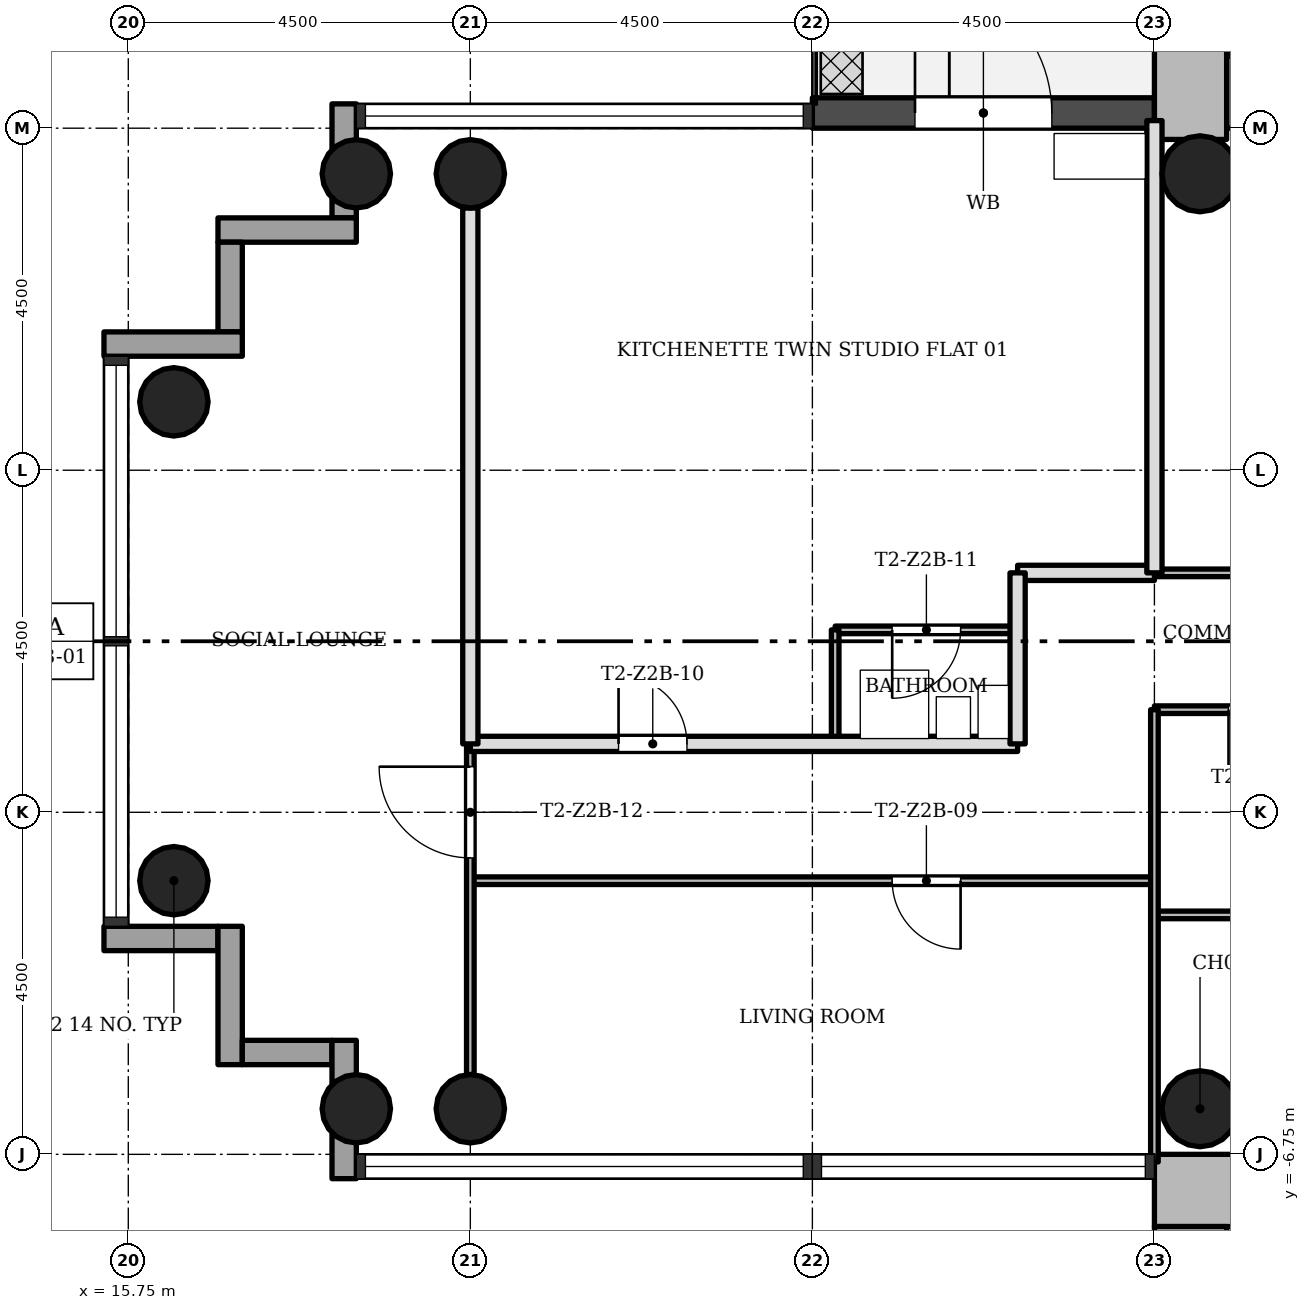
"""IFC4 building model, lengths in metres.
Left out: names, types, materials, properties, quantities, classifications, styles, units other than length and angle.
Written with IfcOpenShell. Run it as: python <this file> out.ifc"""

import sys

from ifc_helpers import new_model, si_unit, direction, frame, frame_2d, origin, origin_2d, place, context, subcontext, project, spatial, rectangle, hollow_circle, extrude, element, fill, save


model = new_model("IFC4")
c1 = context("Model", 3, precision=1e-05, world=origin(), true_north=direction((0.0, 1.0)))
c2 = subcontext(c1, "Body", "Model", "MODEL_VIEW")
j1 = project(units=[si_unit("LENGTHUNIT", "METRE"), si_unit("PLANEANGLEUNIT", "RADIAN")], contexts=[c1])
p1 = place(None, origin())
s1 = spatial("IfcSite", under=j1, at=p1, CompositionType="ELEMENT")
p2 = place(p1, origin())
s2 = spatial("IfcBuilding", under=s1, at=p2, CompositionType="ELEMENT")
p3 = place(p2, frame((0.0, 0.0, 76.6)))
s3 = spatial("IfcBuildingStorey", under=s2, at=p3, CompositionType="ELEMENT", Elevation=76.6)
p4 = place(p3, frame((30.2, 7.225, 0.0), z_axis=(0.0, 0.0, 1.0), x_axis=(1.0, 0.0, 0.0)))
e1 = element("IfcWall", 1, at=p4, inside=s3, PredefinedType="SHEAR", context=c2, shape_type="SweptSolid", body=[
    extrude(rectangle(XDim=12.55, YDim=0.95, at=frame_2d((6.275, 0.0))), origin(), (0.0, 0.0, 1.0), 3.4),
])
p5 = place(p4, frame((4.9, 0.0, 0.0)))
e2 = element("IfcOpeningElement", 2, at=p5, cuts=e1, PredefinedType="OPENING", context=c2, shape_type="SweptSolid", body=[
    extrude(rectangle(XDim=1.8, YDim=2.1, at=frame_2d((0.9, 1.05))), frame((0.0, 0.485, 0.0), z_axis=(0.0, -1.0, 0.0), x_axis=(1.0, 0.0, 0.0)), (0.0, 0.0, 1.0), 0.97),
])
p6 = place(p3, frame((29.725, 15.298, 0.0), z_axis=(0.0, 0.0, 1.0), x_axis=(0.0, -1.0, 0.0)))
e3 = element("IfcWall", 3, at=p6, inside=s3, PredefinedType="SHEAR", context=c2, shape_type="SweptSolid", body=[
    extrude(rectangle(XDim=8.696, YDim=0.95, at=frame_2d((4.348, 0.0))), origin(), (0.0, 0.0, 1.0), 3.4),
])
p7 = place(p3, frame((41.8, -7.225, 0.0), z_axis=(0.0, 0.0, 1.0), x_axis=(-1.0, 0.0, 0.0)))
e4 = element("IfcWall", 4, at=p7, inside=s3, PredefinedType="SHEAR", context=c2, shape_type="SweptSolid", body=[
    extrude(rectangle(XDim=12.55, YDim=0.95, at=frame_2d((6.275, 0.0))), origin(), (0.0, 0.0, 1.0), 3.4),
])
p8 = place(p7, frame((4.9, 0.0, 0.0)))
e5 = element("IfcOpeningElement", 5, at=p8, cuts=e4, PredefinedType="OPENING", context=c2, shape_type="SweptSolid", body=[
    extrude(rectangle(XDim=1.8, YDim=2.1, at=frame_2d((0.9, 1.05))), frame((0.0, 0.485, 0.0), z_axis=(0.0, -1.0, 0.0), x_axis=(1.0, 0.0, 0.0)), (0.0, 0.0, 1.0), 0.97),
])
p9 = place(p3, frame((29.725, -7.7, 0.0), z_axis=(0.0, 0.0, 1.0), x_axis=(0.0, -1.0, 0.0)))
e6 = element("IfcWall", 6, at=p9, inside=s3, PredefinedType="SHEAR", context=c2, shape_type="SweptSolid", body=[
    extrude(rectangle(XDim=8.05, YDim=0.95, at=frame_2d((4.025, 0.0))), origin(), (0.0, 0.0, 1.0), 3.4),
])
for number, where, z_axis, x_axis in (
    (7, (20.25, 6.15, 0.0), (0.0, 0.0, 1.0), (1.0, 0.0, 0.0)),
    (8, (20.25, -6.15, 0.0), (0.0, 0.0, 1.0), (1.0, 0.0, 0.0)),
    (9, (18.75, 6.15, 0.0), (0.0, 0.0, 1.0), (1.0, 0.0, 0.0)),
    (10, (18.75, -6.15, 0.0), (0.0, 0.0, 1.0), (1.0, 0.0, 0.0)),
    (11, (16.35, 3.15, 0.0), (0.0, 0.0, 1.0), (1.0, 0.0, 0.0)),
    (12, (16.35, -3.15, 0.0), (0.0, 0.0, 1.0), (1.0, 0.0, 0.0)),
):
    element("IfcColumn", number, at=place(p3, frame(where, z_axis=z_axis, x_axis=x_axis)), inside=s3, PredefinedType="COLUMN", context=c2, shape_type="SweptSolid", body=[
        extrude(hollow_circle(Radius=0.45, WallThickness=0.032, at=origin_2d()), origin(), (0.0, 0.0, 1.0), 3.4),
    ])
for number, where, z_axis, x_axis in (
    (13, (29.85, 6.15, 0.0), (0.0, 0.0, 1.0), (1.0, 0.0, 0.0)),
    (14, (29.85, -6.15, 0.0), (0.0, 0.0, 1.0), (1.0, 0.0, 0.0)),
):
    element("IfcColumn", number, at=place(p3, frame(where, z_axis=z_axis, x_axis=x_axis)), inside=s3, PredefinedType="COLUMN", context=c2, shape_type="SweptSolid", body=[
        extrude(hollow_circle(Radius=0.5, WallThickness=0.036, at=origin_2d()), origin(), (0.0, 0.0, 1.0), 3.4),
    ])
p10 = place(p3, frame((29.25, 6.95, -0.02), z_axis=(0.0, 0.0, 1.0), x_axis=(-1.0, 0.0, 0.0)))
e15 = element("IfcWall", 15, at=p10, inside=s3, PredefinedType="STANDARD", context=c2, shape_type="SweptSolid", body=[
    extrude(rectangle(XDim=4.5, YDim=0.4, at=frame_2d((2.25, 0.0))), origin(), (0.0, 0.0, 1.0), 3.12),
])
p11 = place(p10, frame((1.35, 0.0, 0.02)))
e16 = element("IfcOpeningElement", 16, at=p11, cuts=e15, PredefinedType="OPENING", context=c2, shape_type="SweptSolid", body=[
    extrude(rectangle(XDim=1.8, YDim=2.1, at=frame_2d((0.9, 1.05))), frame((0.0, 0.21, 0.0), z_axis=(0.0, -1.0, 0.0), x_axis=(1.0, 0.0, 0.0)), (0.0, 0.0, 1.0), 0.42),
])
p12 = place(p3, frame((18.59, 7.07, -0.3), z_axis=(0.0, 0.0, 1.0), x_axis=(0.0, -1.0, 0.0)))
e17 = element("IfcWall", 17, at=p12, inside=s3, PredefinedType="STANDARD", context=c2, shape_type="SweptSolid", body=[
    extrude(rectangle(XDim=1.5, YDim=0.32, at=frame_2d((0.75, 0.0))), origin(), (0.0, 0.0, 1.0), 3.4),
])
p13 = place(p3, frame((18.75, 5.41, -0.3), z_axis=(0.0, 0.0, 1.0), x_axis=(-1.0, 0.0, 0.0)))
e18 = element("IfcWall", 18, at=p13, inside=s3, PredefinedType="STANDARD", context=c2, shape_type="SweptSolid", body=[
    extrude(rectangle(XDim=1.82, YDim=0.32, at=frame_2d((0.91, 0.0))), origin(), (0.0, 0.0, 1.0), 3.4),
])
p14 = place(p3, frame((17.09, 5.25, -0.3), z_axis=(0.0, 0.0, 1.0), x_axis=(0.0, -1.0, 0.0)))
e19 = element("IfcWall", 19, at=p14, inside=s3, PredefinedType="STANDARD", context=c2, shape_type="SweptSolid", body=[
    extrude(rectangle(XDim=1.18, YDim=0.32, at=frame_2d((0.59, 0.0))), origin(), (0.0, 0.0, 1.0), 3.4),
])
p15 = place(p3, frame((17.25, 3.91, -0.3), z_axis=(0.0, 0.0, 1.0), x_axis=(-1.0, 0.0, 0.0)))
e20 = element("IfcWall", 20, at=p15, inside=s3, PredefinedType="STANDARD", context=c2, shape_type="SweptSolid", body=[
    extrude(rectangle(XDim=1.82, YDim=0.32, at=frame_2d((0.91, 0.0))), origin(), (0.0, 0.0, 1.0), 3.4),
])
p16 = place(p3, frame((15.43, -3.91, -0.3), z_axis=(0.0, 0.0, 1.0), x_axis=(1.0, 0.0, 0.0)))
e21 = element("IfcWall", 21, at=p16, inside=s3, PredefinedType="STANDARD", context=c2, shape_type="SweptSolid", body=[
    extrude(rectangle(XDim=1.5, YDim=0.32, at=frame_2d((0.75, 0.0))), origin(), (0.0, 0.0, 1.0), 3.4),
])
p17 = place(p3, frame((17.09, -3.75, -0.3), z_axis=(0.0, 0.0, 1.0), x_axis=(0.0, -1.0, 0.0)))
e22 = element("IfcWall", 22, at=p17, inside=s3, PredefinedType="STANDARD", context=c2, shape_type="SweptSolid", body=[
    extrude(rectangle(XDim=1.82, YDim=0.32, at=frame_2d((0.91, 0.0))), origin(), (0.0, 0.0, 1.0), 3.4),
])
p18 = place(p3, frame((17.25, -5.41, -0.3), z_axis=(0.0, 0.0, 1.0), x_axis=(1.0, 0.0, 0.0)))
e23 = element("IfcWall", 23, at=p18, inside=s3, PredefinedType="STANDARD", context=c2, shape_type="SweptSolid", body=[
    extrude(rectangle(XDim=1.18, YDim=0.32, at=frame_2d((0.59, 0.0))), origin(), (0.0, 0.0, 1.0), 3.4),
])
p19 = place(p3, frame((18.59, -5.25, -0.3), z_axis=(0.0, 0.0, 1.0), x_axis=(0.0, -1.0, 0.0)))
e24 = element("IfcWall", 24, at=p19, inside=s3, PredefinedType="STANDARD", context=c2, shape_type="SweptSolid", body=[
    extrude(rectangle(XDim=1.82, YDim=0.32, at=frame_2d((0.91, 0.0))), origin(), (0.0, 0.0, 1.0), 3.4),
])
p20 = place(p3, frame((34.5, -3.6, 0.0), z_axis=(0.0, 0.0, 1.0), x_axis=(-1.0, 0.0, 0.0)))
e25 = element("IfcWall", 25, at=p20, inside=s3, PredefinedType="PARTITIONING", context=c2, shape_type="SweptSolid", body=[
    extrude(rectangle(XDim=5.25, YDim=0.1, at=frame_2d((2.625, 0.0))), origin(), (0.0, 0.0, 1.0), 3.0),
])
p21 = place(p3, frame((29.25, -3.15, 0.0), z_axis=(0.0, 0.0, 1.0), x_axis=(-1.0, 0.0, 0.0)))
e26 = element("IfcWall", 26, at=p21, inside=s3, PredefinedType="PARTITIONING", context=c2, shape_type="SweptSolid", body=[
    extrude(rectangle(XDim=9.0, YDim=0.1, at=frame_2d((4.5, 0.0))), origin(), (0.0, 0.0, 1.0), 3.0),
])
p22 = place(p21, frame((2.55, 0.0, 0.0)))
e27 = element("IfcOpeningElement", 27, at=p22, cuts=e26, PredefinedType="OPENING", context=c2, shape_type="SweptSolid", body=[
    extrude(rectangle(XDim=0.9, YDim=2.1, at=frame_2d((0.45, 1.05))), frame((0.0, 0.06, 0.0), z_axis=(0.0, -1.0, 0.0), x_axis=(1.0, 0.0, 0.0)), (0.0, 0.0, 1.0), 0.12),
])
p23 = place(p3, frame((27.45, -1.35, 0.0), z_axis=(0.0, 0.0, 1.0), x_axis=(-1.0, 0.0, 0.0)))
e28 = element("IfcWall", 28, at=p23, inside=s3, PredefinedType="SOLIDWALL", context=c2, shape_type="SweptSolid", body=[
    extrude(rectangle(XDim=7.2, YDim=0.2, at=frame_2d((3.6, 0.0))), origin(), (0.0, 0.0, 1.0), 3.0),
])
p24 = place(p23, frame((4.35, 0.0, 0.0)))
e29 = element("IfcOpeningElement", 29, at=p24, cuts=e28, PredefinedType="OPENING", context=c2, shape_type="SweptSolid", body=[
    extrude(rectangle(XDim=0.9, YDim=2.1, at=frame_2d((0.45, 1.05))), frame((0.0, 0.11, 0.0), z_axis=(0.0, -1.0, 0.0), x_axis=(1.0, 0.0, 0.0)), (0.0, 0.0, 1.0), 0.22),
])
p25 = place(p3, frame((34.5, -0.9, 0.0), z_axis=(0.0, 0.0, 1.0), x_axis=(-1.0, 0.0, 0.0)))
e30 = element("IfcWall", 30, at=p25, inside=s3, PredefinedType="PARTITIONING", context=c2, shape_type="SweptSolid", body=[
    extrude(rectangle(XDim=5.25, YDim=0.1, at=frame_2d((2.625, 0.0))), origin(), (0.0, 0.0, 1.0), 3.0),
])
p26 = place(p25, frame((0.75, 0.0, 0.0)))
e31 = element("IfcOpeningElement", 31, at=p26, cuts=e30, PredefinedType="OPENING", context=c2, shape_type="SweptSolid", body=[
    extrude(rectangle(XDim=0.9, YDim=2.1, at=frame_2d((0.45, 1.05))), frame((0.0, 0.06, 0.0), z_axis=(0.0, -1.0, 0.0), x_axis=(1.0, 0.0, 0.0)), (0.0, 0.0, 1.0), 0.12),
])
p27 = place(p25, frame((3.375, 0.0, 0.0)))
e32 = element("IfcOpeningElement", 32, at=p27, cuts=e30, PredefinedType="OPENING", context=c2, shape_type="SweptSolid", body=[
    extrude(rectangle(XDim=0.9, YDim=2.1, at=frame_2d((0.45, 1.05))), frame((0.0, 0.06, 0.0), z_axis=(0.0, -1.0, 0.0), x_axis=(1.0, 0.0, 0.0)), (0.0, 0.0, 1.0), 0.12),
])
p28 = place(p3, frame((27.45, 0.15, 0.0), z_axis=(0.0, 0.0, 1.0), x_axis=(-1.0, 0.0, 0.0)))
e33 = element("IfcWall", 33, at=p28, inside=s3, PredefinedType="PARTITIONING", context=c2, shape_type="SweptSolid", body=[
    extrude(rectangle(XDim=2.4, YDim=0.1, at=frame_2d((1.2, 0.0))), origin(), (0.0, 0.0, 1.0), 3.0),
])
p29 = place(p28, frame((0.75, 0.0, 0.0)))
e34 = element("IfcOpeningElement", 34, at=p29, cuts=e33, PredefinedType="OPENING", context=c2, shape_type="SweptSolid", body=[
    extrude(rectangle(XDim=0.9, YDim=2.1, at=frame_2d((0.45, 1.05))), frame((0.0, 0.06, 0.0), z_axis=(0.0, -1.0, 0.0), x_axis=(1.0, 0.0, 0.0)), (0.0, 0.0, 1.0), 0.12),
])
p30 = place(p3, frame((34.5, 0.9, 0.0), z_axis=(0.0, 0.0, 1.0), x_axis=(-1.0, 0.0, 0.0)))
e35 = element("IfcWall", 35, at=p30, inside=s3, PredefinedType="PARTITIONING", context=c2, shape_type="SweptSolid", body=[
    extrude(rectangle(XDim=5.25, YDim=0.1, at=frame_2d((2.625, 0.0))), origin(), (0.0, 0.0, 1.0), 3.0),
])
p31 = place(p3, frame((29.25, 0.9, 0.0), z_axis=(0.0, 0.0, 1.0), x_axis=(-1.0, 0.0, 0.0)))
e36 = element("IfcWall", 36, at=p31, inside=s3, PredefinedType="SOLIDWALL", context=c2, shape_type="SweptSolid", body=[
    extrude(rectangle(XDim=1.8, YDim=0.2, at=frame_2d((0.9, 0.0))), origin(), (0.0, 0.0, 1.0), 3.0),
])
p32 = place(p3, frame((29.25, -6.85, 0.0), z_axis=(0.0, 0.0, 1.0), x_axis=(0.0, 1.0, 0.0)))
e37 = element("IfcWall", 37, at=p32, inside=s3, PredefinedType="PARTITIONING", context=c2, shape_type="SweptSolid", body=[
    extrude(rectangle(XDim=5.95, YDim=0.1, at=frame_2d((2.975, 0.0))), origin(), (0.0, 0.0, 1.0), 3.0),
])
p33 = place(p3, frame((29.25, 0.9, 0.0), z_axis=(0.0, 0.0, 1.0), x_axis=(0.0, 1.0, 0.0)))
e38 = element("IfcWall", 38, at=p33, inside=s3, PredefinedType="SOLIDWALL", context=c2, shape_type="SweptSolid", body=[
    extrude(rectangle(XDim=5.95, YDim=0.2, at=frame_2d((2.975, 0.0))), origin(), (0.0, 0.0, 1.0), 3.0),
])
p34 = place(p3, frame((27.45, -1.35, 0.0), z_axis=(0.0, 0.0, 1.0), x_axis=(0.0, 1.0, 0.0)))
e39 = element("IfcWall", 39, at=p34, inside=s3, PredefinedType="SOLIDWALL", context=c2, shape_type="SweptSolid", body=[
    extrude(rectangle(XDim=2.25, YDim=0.2, at=frame_2d((1.125, 0.0))), origin(), (0.0, 0.0, 1.0), 3.0),
])
p35 = place(p3, frame((25.05, -1.35, 0.0), z_axis=(0.0, 0.0, 1.0), x_axis=(0.0, 1.0, 0.0)))
e40 = element("IfcWall", 40, at=p35, inside=s3, PredefinedType="PARTITIONING", context=c2, shape_type="SweptSolid", body=[
    extrude(rectangle(XDim=1.5, YDim=0.1, at=frame_2d((0.75, 0.0))), origin(), (0.0, 0.0, 1.0), 3.0),
])
p36 = place(p3, frame((20.25, -5.7, 0.0), z_axis=(0.0, 0.0, 1.0), x_axis=(0.0, 1.0, 0.0)))
e41 = element("IfcWall", 41, at=p36, inside=s3, PredefinedType="PARTITIONING", context=c2, shape_type="SweptSolid", body=[
    extrude(rectangle(XDim=4.35, YDim=0.1, at=frame_2d((2.175, 0.0))), origin(), (0.0, 0.0, 1.0), 3.0),
])
p37 = place(p36, frame((2.85, 0.0, 0.0)))
e42 = element("IfcOpeningElement", 42, at=p37, cuts=e41, PredefinedType="OPENING", context=c2, shape_type="SweptSolid", body=[
    extrude(rectangle(XDim=1.2, YDim=2.1, at=frame_2d((0.6, 1.05))), frame((0.0, 0.06, 0.0), z_axis=(0.0, -1.0, 0.0), x_axis=(1.0, 0.0, 0.0)), (0.0, 0.0, 1.0), 0.12),
])
p38 = place(p3, frame((20.25, -1.35, 0.0), z_axis=(0.0, 0.0, 1.0), x_axis=(0.0, 1.0, 0.0)))
e43 = element("IfcWall", 43, at=p38, inside=s3, PredefinedType="SOLIDWALL", context=c2, shape_type="SweptSolid", body=[
    extrude(rectangle(XDim=7.05, YDim=0.2, at=frame_2d((3.525, 0.0))), origin(), (0.0, 0.0, 1.0), 3.0),
])
p39 = place(p3, frame((34.1, 7.825, 0.0), z_axis=(0.0, 0.0, 1.0), x_axis=(-1.0, 0.0, 0.0)))
e44 = element("IfcWall", 44, at=p39, inside=s3, PredefinedType="SHEAR", context=c2, shape_type="SweptSolid", body=[
    extrude(rectangle(XDim=3.9, YDim=0.25, at=frame_2d((1.95, 0.0))), origin(), (0.0, 0.0, 1.0), 3.4),
])
p40 = place(p11, origin())
e45 = element("IfcDoor", 45, at=p40, inside=s3, OperationType="SINGLE_SWING_RIGHT", PredefinedType="DOOR", context=c2, shape_type="SweptSolid", body=[
    extrude(rectangle(XDim=1.8, YDim=2.1, at=frame_2d((0.9, 1.05))), frame((0.0, 0.025, 0.0), z_axis=(0.0, -1.0, 0.0), x_axis=(1.0, 0.0, 0.0)), (0.0, 0.0, 1.0), 0.05),
])
fill(e16, e45)
p41 = place(p27, origin())
e46 = element("IfcDoor", 46, at=p41, inside=s3, OperationType="SINGLE_SWING_LEFT", PredefinedType="DOOR", context=c2, shape_type="SweptSolid", body=[
    extrude(rectangle(XDim=0.9, YDim=2.1, at=frame_2d((0.45, 1.05))), frame((0.0, 0.025, 0.0), z_axis=(0.0, -1.0, 0.0), x_axis=(1.0, 0.0, 0.0)), (0.0, 0.0, 1.0), 0.05),
])
fill(e32, e46)
p42 = place(p22, origin())
e47 = element("IfcDoor", 47, at=p42, inside=s3, OperationType="SINGLE_SWING_RIGHT", PredefinedType="DOOR", context=c2, shape_type="SweptSolid", body=[
    extrude(rectangle(XDim=0.9, YDim=2.1, at=frame_2d((0.45, 1.05))), frame((0.0, 0.025, 0.0), z_axis=(0.0, -1.0, 0.0), x_axis=(1.0, 0.0, 0.0)), (0.0, 0.0, 1.0), 0.05),
])
fill(e27, e47)
p43 = place(p24, origin())
e48 = element("IfcDoor", 48, at=p43, inside=s3, OperationType="SINGLE_SWING_RIGHT", PredefinedType="DOOR", context=c2, shape_type="SweptSolid", body=[
    extrude(rectangle(XDim=0.9, YDim=2.1, at=frame_2d((0.45, 1.05))), frame((0.0, 0.025, 0.0), z_axis=(0.0, -1.0, 0.0), x_axis=(1.0, 0.0, 0.0)), (0.0, 0.0, 1.0), 0.05),
])
fill(e29, e48)
p44 = place(p29, origin())
e49 = element("IfcDoor", 49, at=p44, inside=s3, OperationType="SINGLE_SWING_LEFT", PredefinedType="DOOR", context=c2, shape_type="SweptSolid", body=[
    extrude(rectangle(XDim=0.9, YDim=2.1, at=frame_2d((0.45, 1.05))), frame((0.0, 0.025, 0.0), z_axis=(0.0, -1.0, 0.0), x_axis=(1.0, 0.0, 0.0)), (0.0, 0.0, 1.0), 0.05),
])
fill(e34, e49)
p45 = place(p37, origin())
e50 = element("IfcDoor", 50, at=p45, inside=s3, OperationType="SINGLE_SWING_LEFT", PredefinedType="DOOR", context=c2, shape_type="SweptSolid", body=[
    extrude(rectangle(XDim=1.2, YDim=2.1, at=frame_2d((0.6, 1.05))), frame((0.0, 0.025, 0.0), z_axis=(0.0, -1.0, 0.0), x_axis=(1.0, 0.0, 0.0)), (0.0, 0.0, 1.0), 0.05),
])
fill(e42, e50)
save(model, sys.argv[1])
